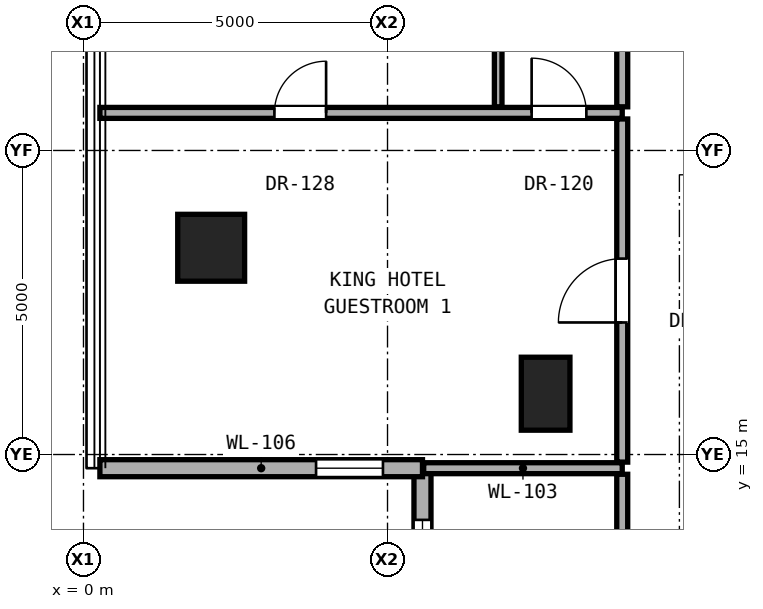
"""IFC4 building model, lengths in metres.
Left out: names, types, materials, properties, quantities, classifications, styles, units other than length and angle.
Written with IfcOpenShell. Run it as: python <this file> out.ifc"""

import sys

from ifc_helpers import new_model, si_unit, direction, frame, frame_2d, origin, origin_2d, place, context, subcontext, project, spatial, rectangle, hollow_rectangle, extrude, element, fill, save


model = new_model("IFC4")
c1 = context("Model", 3, precision=1e-05, world=origin(), true_north=direction((0.0, 1.0)))
c2 = subcontext(c1, "Body", "Model", "MODEL_VIEW")
j1 = project(units=[si_unit("LENGTHUNIT", "METRE"), si_unit("PLANEANGLEUNIT", "RADIAN")], contexts=[c1])
p1 = place(None, origin())
s1 = spatial("IfcSite", under=j1, at=p1, CompositionType="ELEMENT")
p2 = place(p1, origin())
s2 = spatial("IfcBuilding", under=s1, at=p2, CompositionType="ELEMENT")
p3 = place(p2, frame((0.0, 0.0, 88.4)))
s3 = spatial("IfcBuildingStorey", under=s2, at=p3, CompositionType="ELEMENT", Elevation=88.4)
p4 = place(p3, frame((2.1, 18.4, 0.0), z_axis=(0.0, 0.0, 1.0), x_axis=(1.0, 0.0, 0.0)))
e1 = element("IfcColumn", 1, at=p4, inside=s3, PredefinedType="COLUMN", context=c2, shape_type="SweptSolid", body=[
    extrude(hollow_rectangle(XDim=1.1, YDim=1.1, WallThickness=0.06, at=origin_2d()), origin(), (0.0, 0.0, 1.0), 3.3),
])
p5 = place(p3, frame((7.6, 16.0, 0.0), z_axis=(0.0, 0.0, 1.0), x_axis=(1.0, 0.0, 0.0)))
e2 = element("IfcColumn", 2, at=p5, inside=s3, PredefinedType="PILASTER", context=c2, shape_type="SweptSolid", body=[
    extrude(rectangle(XDim=0.8, YDim=1.2, at=origin_2d()), origin(), (0.0, 0.0, 1.0), 3.3),
])
p6 = place(p3, frame((5.575, 14.775, 0.0), z_axis=(0.0, 0.0, 1.0), x_axis=(0.0, -1.0, 0.0)))
e3 = element("IfcWall", 3, at=p6, inside=s3, PredefinedType="SOLIDWALL", context=c2, shape_type="SweptSolid", body=[
    extrude(rectangle(XDim=5.305, YDim=0.28, at=frame_2d((2.652, 0.0))), origin(), (0.0, 0.0, 1.0), 3.06),
])
p7 = place(p6, frame((0.85, 0.0, 0.81)))
e4 = element("IfcOpeningElement", 4, at=p7, cuts=e3, PredefinedType="OPENING", context=c2, shape_type="SweptSolid", body=[
    extrude(rectangle(XDim=1.8, YDim=2.1, at=frame_2d((0.9, 1.05))), frame((0.0, 0.15, 0.0), z_axis=(0.0, -1.0, 0.0), x_axis=(1.0, 0.0, 0.0)), (0.0, 0.0, 1.0), 0.3),
])
p8 = place(p3, frame((0.27, 14.775, 0.0), z_axis=(0.0, 0.0, 1.0), x_axis=(1.0, 0.0, 0.0)))
e5 = element("IfcWall", 5, at=p8, inside=s3, PredefinedType="SOLIDWALL", context=c2, shape_type="SweptSolid", body=[
    extrude(rectangle(XDim=5.305, YDim=0.28, at=frame_2d((2.652, 0.0))), origin(), (0.0, 0.0, 1.0), 3.06),
])
p9 = place(p8, frame((3.555, 0.0, 0.85)))
e6 = element("IfcOpeningElement", 6, at=p9, cuts=e5, PredefinedType="OPENING", context=c2, shape_type="SweptSolid", body=[
    extrude(rectangle(XDim=1.1, YDim=2.0, at=frame_2d((0.55, 1.0))), frame((0.0, 0.15, 0.0), z_axis=(0.0, -1.0, 0.0), x_axis=(1.0, 0.0, 0.0)), (0.0, 0.0, 1.0), 0.3),
])
p10 = place(p3, frame((5.595, 14.775, 0.0), z_axis=(0.0, 0.0, 1.0), x_axis=(1.0, 0.0, 0.0)))
e7 = element("IfcWall", 7, at=p10, inside=s3, PredefinedType="PARTITIONING", context=c2, shape_type="SweptSolid", body=[
    extrude(rectangle(XDim=3.265, YDim=0.18, at=frame_2d((1.633, 0.0))), origin(), (0.0, 0.0, 1.0), 3.08),
])
p11 = place(p3, frame((0.27, 20.618, 0.0), z_axis=(0.0, 0.0, 1.0), x_axis=(1.0, 0.0, 0.0)))
e8 = element("IfcWall", 8, at=p11, inside=s3, PredefinedType="PARTITIONING", context=c2, shape_type="SweptSolid", body=[
    extrude(rectangle(XDim=8.59, YDim=0.18, at=frame_2d((4.295, 0.0))), origin(), (0.0, 0.0, 1.0), 2.145),
])
p12 = place(p11, frame((2.87, 0.0, 0.0)))
e9 = element("IfcOpeningElement", 9, at=p12, cuts=e8, PredefinedType="OPENING", context=c2, shape_type="SweptSolid", body=[
    extrude(rectangle(XDim=0.85, YDim=2.01, at=frame_2d((0.425, 1.005))), frame((0.0, 0.1, 0.0), z_axis=(0.0, -1.0, 0.0), x_axis=(1.0, 0.0, 0.0)), (0.0, 0.0, 1.0), 0.2),
])
p13 = place(p11, frame((7.1, 0.0, 0.0)))
e10 = element("IfcOpeningElement", 10, at=p13, cuts=e8, PredefinedType="OPENING", context=c2, shape_type="SweptSolid", body=[
    extrude(rectangle(XDim=0.9, YDim=2.1, at=frame_2d((0.45, 1.05))), frame((0.0, 0.1, 0.0), z_axis=(0.0, -1.0, 0.0), x_axis=(1.0, 0.0, 0.0)), (0.0, 0.0, 1.0), 0.2),
])
p14 = place(p3, frame((6.82, 20.718, 0.0), z_axis=(0.0, 0.0, 1.0), x_axis=(0.0, 1.0, 0.0)))
e11 = element("IfcWall", 11, at=p14, inside=s3, PredefinedType="PARTITIONING", context=c2, shape_type="SweptSolid", body=[
    extrude(rectangle(XDim=2.1, YDim=0.125, at=frame_2d((1.05, 0.0))), origin(), (0.0, 0.0, 1.0), 3.08),
])
p15 = place(p3, frame((8.86, 9.47, 0.0), z_axis=(0.0, 0.0, 1.0), x_axis=(0.0, 1.0, 0.0)))
e12 = element("IfcWall", 12, at=p15, inside=s3, PredefinedType="PARTITIONING", context=c2, shape_type="SweptSolid", body=[
    extrude(rectangle(XDim=5.205, YDim=0.18, at=frame_2d((2.603, 0.0))), origin(), (0.0, 0.0, 1.0), 3.08),
])
p16 = place(p15, frame((2.127, 0.0, 0.0)))
e13 = element("IfcOpeningElement", 13, at=p16, cuts=e12, PredefinedType="OPENING", context=c2, shape_type="SweptSolid", body=[
    extrude(rectangle(XDim=0.95, YDim=2.15, at=frame_2d((0.475, 1.075))), frame((0.0, 0.1, 0.0), z_axis=(0.0, -1.0, 0.0), x_axis=(1.0, 0.0, 0.0)), (0.0, 0.0, 1.0), 0.2),
])
p17 = place(p3, frame((8.86, 14.875, 0.0), z_axis=(0.0, 0.0, 1.0), x_axis=(0.0, 1.0, 0.0)))
e14 = element("IfcWall", 14, at=p17, inside=s3, PredefinedType="PARTITIONING", context=c2, shape_type="SweptSolid", body=[
    extrude(rectangle(XDim=5.643, YDim=0.18, at=frame_2d((2.822, 0.0))), origin(), (0.0, 0.0, 1.0), 2.456),
])
p18 = place(p17, frame((2.296, 0.0, 0.0)))
e15 = element("IfcOpeningElement", 15, at=p18, cuts=e14, PredefinedType="OPENING", context=c2, shape_type="SweptSolid", body=[
    extrude(rectangle(XDim=1.05, YDim=2.2, at=frame_2d((0.525, 1.1))), frame((0.0, 0.1, 0.0), z_axis=(0.0, -1.0, 0.0), x_axis=(1.0, 0.0, 0.0)), (0.0, 0.0, 1.0), 0.2),
])
p19 = place(p3, frame((8.86, 20.718, 0.0), z_axis=(0.0, 0.0, 1.0), x_axis=(0.0, 1.0, 0.0)))
e16 = element("IfcWall", 16, at=p19, inside=s3, PredefinedType="PARTITIONING", context=c2, shape_type="SweptSolid", body=[
    extrude(rectangle(XDim=2.1, YDim=0.18, at=frame_2d((1.05, 0.0))), origin(), (0.0, 0.0, 1.0), 3.08),
])
p20 = place(p7, origin())
e17 = element("IfcWindow", 17, at=p20, inside=s3, PartitioningType="SINGLE_PANEL", PredefinedType="WINDOW", context=c2, shape_type="SweptSolid", body=[
    extrude(rectangle(XDim=1.8, YDim=2.1, at=frame_2d((0.9, 1.05))), frame((0.0, 0.03, 0.0), z_axis=(0.0, -1.0, 0.0), x_axis=(1.0, 0.0, 0.0)), (0.0, 0.0, 1.0), 0.06),
])
fill(e4, e17)
p21 = place(p9, origin())
e18 = element("IfcWindow", 18, at=p21, inside=s3, PartitioningType="SINGLE_PANEL", PredefinedType="WINDOW", context=c2, shape_type="SweptSolid", body=[
    extrude(rectangle(XDim=1.1, YDim=2.0, at=frame_2d((0.55, 1.0))), frame((0.0, 0.03, 0.0), z_axis=(0.0, -1.0, 0.0), x_axis=(1.0, 0.0, 0.0)), (0.0, 0.0, 1.0), 0.06),
])
fill(e6, e18)
p22 = place(p18, origin())
e19 = element("IfcDoor", 19, at=p22, inside=s3, OperationType="SINGLE_SWING_LEFT", PredefinedType="DOOR", context=c2, shape_type="SweptSolid", body=[
    extrude(rectangle(XDim=1.05, YDim=2.2, at=frame_2d((0.525, 1.1))), frame((0.0, 0.025, 0.0), z_axis=(0.0, -1.0, 0.0), x_axis=(1.0, 0.0, 0.0)), (0.0, 0.0, 1.0), 0.05),
])
fill(e15, e19)
p23 = place(p12, origin())
e20 = element("IfcDoor", 20, at=p23, inside=s3, OperationType="SINGLE_SWING_RIGHT", PredefinedType="DOOR", context=c2, shape_type="SweptSolid", body=[
    extrude(rectangle(XDim=0.85, YDim=2.01, at=frame_2d((0.425, 1.005))), frame((0.0, 0.025, 0.0), z_axis=(0.0, -1.0, 0.0), x_axis=(1.0, 0.0, 0.0)), (0.0, 0.0, 1.0), 0.05),
])
fill(e9, e20)
p24 = place(p13, origin())
e21 = element("IfcDoor", 21, at=p24, inside=s3, OperationType="SINGLE_SWING_LEFT", PredefinedType="DOOR", context=c2, shape_type="SweptSolid", body=[
    extrude(rectangle(XDim=0.9, YDim=2.1, at=frame_2d((0.45, 1.05))), frame((0.0, 0.025, 0.0), z_axis=(0.0, -1.0, 0.0), x_axis=(1.0, 0.0, 0.0)), (0.0, 0.0, 1.0), 0.05),
])
fill(e10, e21)
save(model, sys.argv[1])
